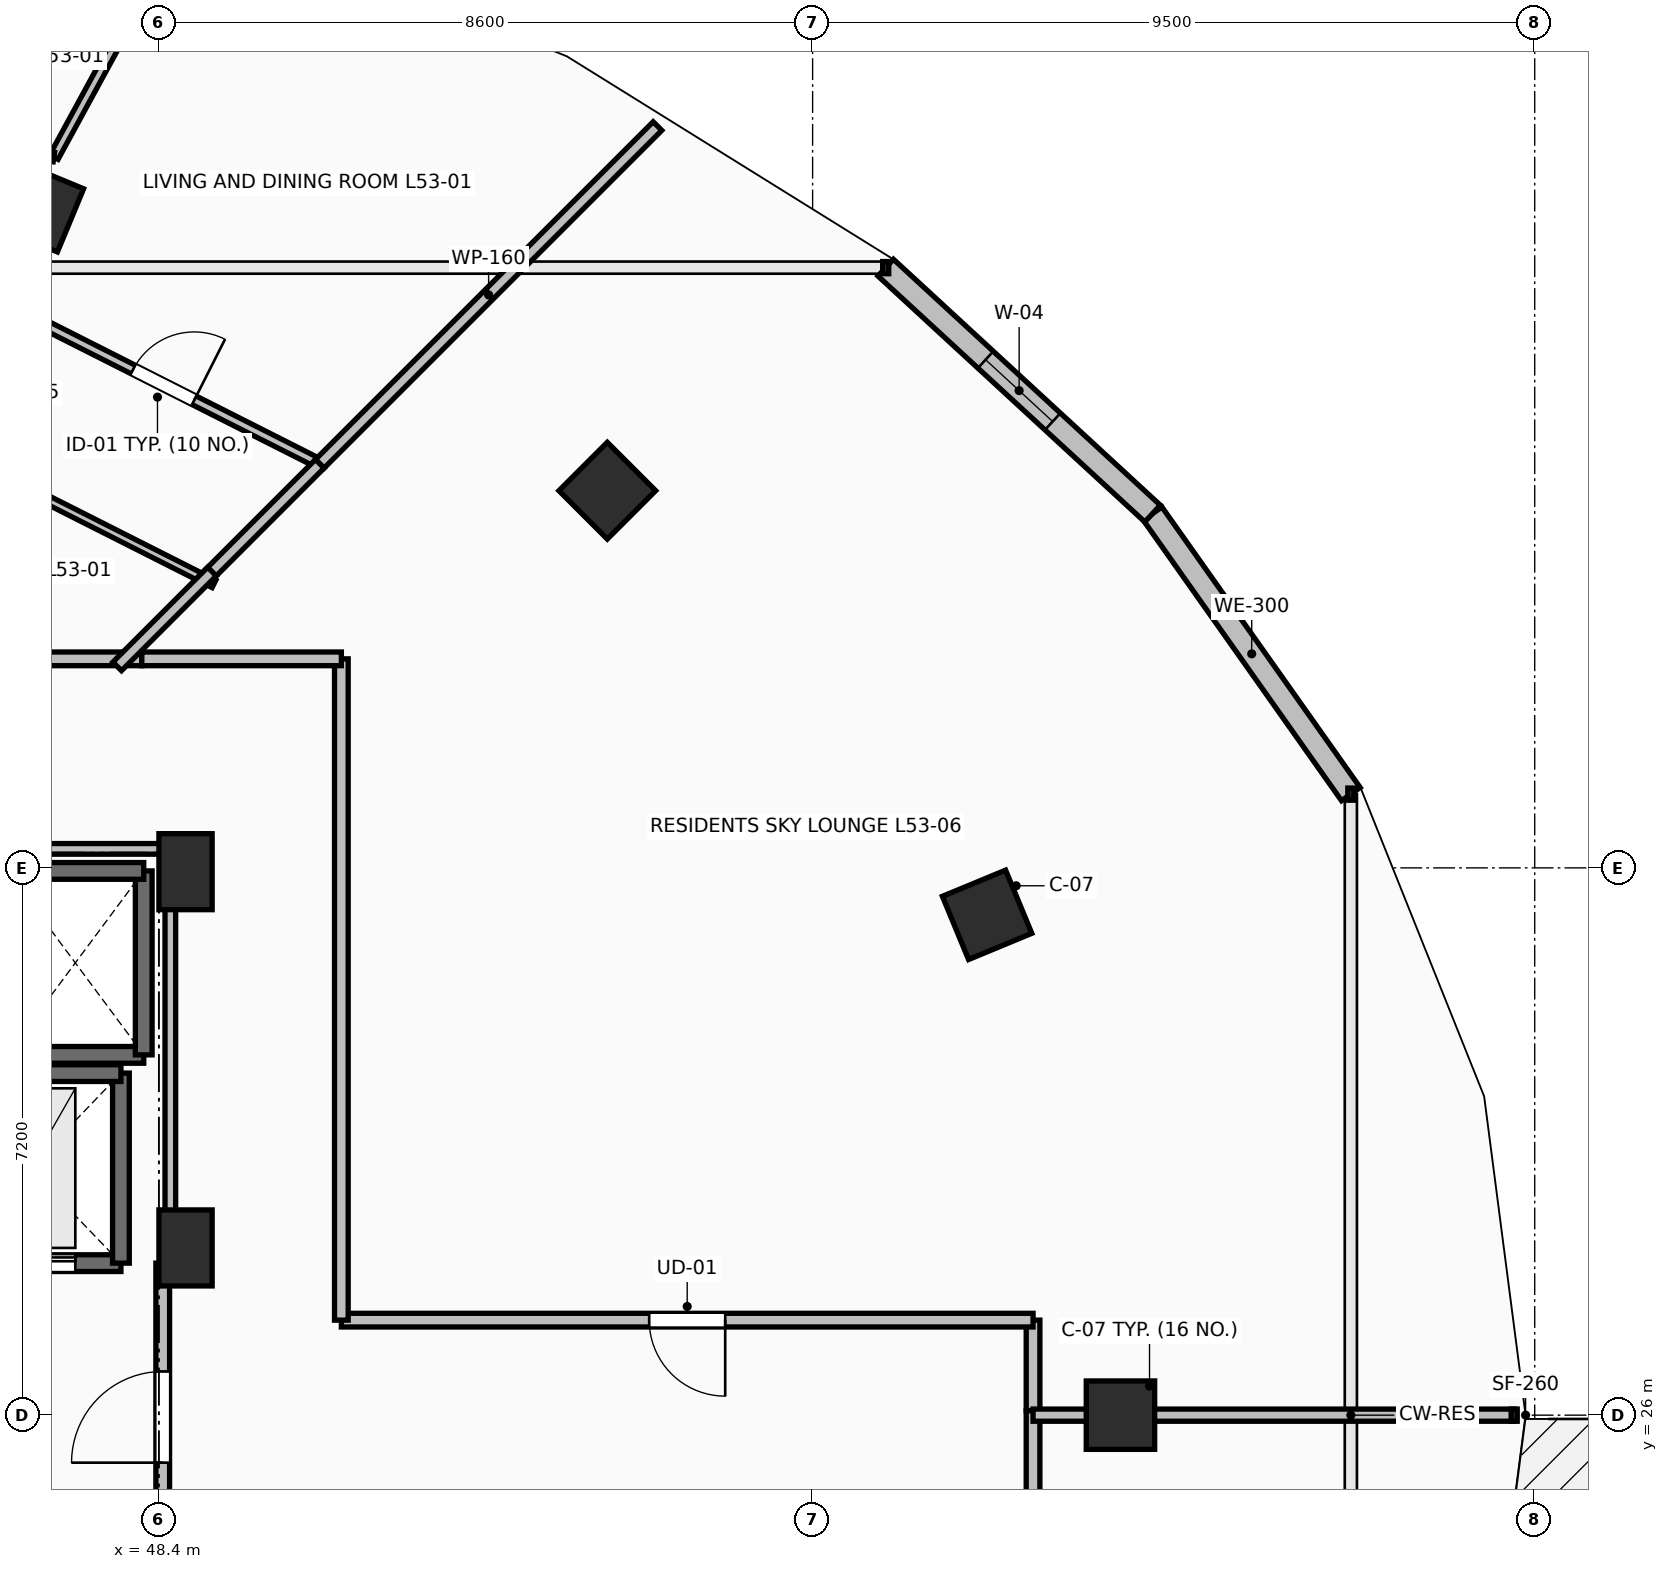
"""IFC4 building model, lengths in metres.
Left out: names, types, materials, properties, quantities, classifications, styles, units other than length and angle.
Written with IfcOpenShell. Run it as: python <this file> out.ifc"""

import sys

from ifc_helpers import new_model, si_unit, direction, frame, frame_2d, origin, origin_2d, place, context, subcontext, project, spatial, rectangle, extrude, element, fill, save


model = new_model("IFC4")
c1 = context("Model", 3, precision=1e-05, world=origin(), true_north=direction((0.0, 1.0)))
c2 = subcontext(c1, "Body", "Model", "MODEL_VIEW")
j1 = project(units=[si_unit("LENGTHUNIT", "METRE"), si_unit("PLANEANGLEUNIT", "RADIAN")], contexts=[c1])
p1 = place(None, origin())
s1 = spatial("IfcSite", under=j1, at=p1, CompositionType="ELEMENT")
p2 = place(p1, origin())
s2 = spatial("IfcBuilding", under=s1, at=p2, CompositionType="ELEMENT")
p3 = place(p2, frame((0.0, 0.0, 196.6)))
s3 = spatial("IfcBuildingStorey", under=s2, at=p3, CompositionType="ELEMENT", Elevation=196.6)
for number, where, z_axis, x_axis in (
    (1, (61.05, 26.0, 0.0), (0.0, 0.0, 1.0), (1.0, 0.0, 0.0)),
    (2, (59.295, 32.582, 0.0), (0.0, 0.0, 1.0), (0.924, 0.383, 0.0)),
    (3, (54.299, 38.162, 0.0), (0.0, 0.0, 1.0), (0.707, 0.707, 0.0)),
    (4, (46.821, 41.891, 0.0), (0.0, 0.0, 1.0), (0.383, 0.924, 0.0)),
):
    element("IfcColumn", number, at=place(p3, frame(where, z_axis=z_axis, x_axis=x_axis)), inside=s3, PredefinedType="COLUMN", context=c2, shape_type="SweptSolid", body=[
        extrude(rectangle(XDim=0.9, YDim=0.9, at=origin_2d()), origin(), (0.0, 0.0, 1.0), 3.5),
    ])
for number, where, z_axis, x_axis in (
    (5, (48.75, 33.15, 0.0), (0.0, 0.0, 1.0), (1.0, 0.0, 0.0)),
    (6, (48.75, 28.2, 0.0), (0.0, 0.0, 1.0), (1.0, 0.0, 0.0)),
):
    element("IfcColumn", number, at=place(p3, frame(where, z_axis=z_axis, x_axis=x_axis)), inside=s3, PredefinedType="PILASTER", context=c2, shape_type="SweptSolid", body=[
        extrude(rectangle(XDim=0.7, YDim=1.0, at=origin_2d()), origin(), (0.0, 0.0, 1.0), 3.5),
    ])
p4 = place(p3, frame((64.081, 34.17, 0.0), z_axis=(0.0, 0.0, 1.0), x_axis=(-0.577168747264, 0.81662490605, 0.0)))
e7 = element("IfcWall", 7, at=p4, inside=s3, PredefinedType="STANDARD", context=c2, shape_type="SweptSolid", body=[
    extrude(rectangle(XDim=4.52, YDim=0.3, at=frame_2d((2.26, 0.0))), origin(), (0.0, 0.0, 1.0), 3.24),
])
p5 = place(p3, frame((61.472, 37.861, 0.0), z_axis=(0.0, 0.0, 1.0), x_axis=(-0.735359993374, 0.677676678177, 0.0)))
e8 = element("IfcWall", 8, at=p5, inside=s3, PredefinedType="STANDARD", context=c2, shape_type="SweptSolid", body=[
    extrude(rectangle(XDim=4.774, YDim=0.3, at=frame_2d((2.387, 0.0))), origin(), (0.0, 0.0, 1.0), 3.24),
])
p6 = place(p5, frame((1.787, 0.0, 0.85)))
e9 = element("IfcOpeningElement", 9, at=p6, cuts=e8, PredefinedType="OPENING", context=c2, shape_type="SweptSolid", body=[
    extrude(rectangle(XDim=1.2, YDim=2.1, at=frame_2d((0.6, 1.05))), frame((0.0, 0.165, 0.0), z_axis=(0.0, -1.0, 0.0), x_axis=(1.0, 0.0, 0.0)), (0.0, 0.0, 1.0), 0.33),
])
p7 = place(p3, frame((46.4, 30.74, 0.0), z_axis=(0.0, 0.0, 1.0), x_axis=(1.0, 0.0, 0.0)))
e10 = element("IfcWall", 10, at=p7, inside=s3, PredefinedType="SOLIDWALL", context=c2, shape_type="SweptSolid", body=[
    extrude(rectangle(XDim=1.8, YDim=0.22, at=frame_2d((0.9, 0.0))), origin(), (0.0, 0.0, 1.0), 3.24),
])
p8 = place(p3, frame((48.2, 30.74, 0.0), z_axis=(0.0, 0.0, 1.0), x_axis=(0.0, 1.0, 0.0)))
e11 = element("IfcWall", 11, at=p8, inside=s3, PredefinedType="SOLIDWALL", context=c2, shape_type="SweptSolid", body=[
    extrude(rectangle(XDim=2.42, YDim=0.22, at=frame_2d((1.21, 0.0))), origin(), (0.0, 0.0, 1.0), 3.24),
])
p9 = place(p3, frame((48.2, 33.16, 0.0), z_axis=(0.0, 0.0, 1.0), x_axis=(-1.0, 0.0, 0.0)))
e12 = element("IfcWall", 12, at=p9, inside=s3, PredefinedType="SOLIDWALL", context=c2, shape_type="SweptSolid", body=[
    extrude(rectangle(XDim=1.8, YDim=0.22, at=frame_2d((0.9, 0.0))), origin(), (0.0, 0.0, 1.0), 3.24),
])
p10 = place(p3, frame((45.5, 28.0, 0.0), z_axis=(0.0, 0.0, 1.0), x_axis=(1.0, 0.0, 0.0)))
e13 = element("IfcWall", 13, at=p10, inside=s3, PredefinedType="SHEAR", context=c2, shape_type="SweptSolid", body=[
    extrude(rectangle(XDim=2.4, YDim=0.22, at=frame_2d((1.2, 0.0))), origin(), (0.0, 0.0, 1.0), 3.24),
])
p11 = place(p10, frame((0.6, 0.0, 0.0)))
e14 = element("IfcOpeningElement", 14, at=p11, cuts=e13, PredefinedType="OPENING", context=c2, shape_type="SweptSolid", body=[
    extrude(rectangle(XDim=1.2, YDim=2.2, at=frame_2d((0.6, 1.1))), frame((0.0, 0.125, 0.0), z_axis=(0.0, -1.0, 0.0), x_axis=(1.0, 0.0, 0.0)), (0.0, 0.0, 1.0), 0.25),
])
p12 = place(p3, frame((47.9, 28.0, 0.0), z_axis=(0.0, 0.0, 1.0), x_axis=(0.0, 1.0, 0.0)))
e15 = element("IfcWall", 15, at=p12, inside=s3, PredefinedType="SHEAR", context=c2, shape_type="SweptSolid", body=[
    extrude(rectangle(XDim=2.5, YDim=0.22, at=frame_2d((1.25, 0.0))), origin(), (0.0, 0.0, 1.0), 3.24),
])
p13 = place(p3, frame((47.9, 30.5, 0.0), z_axis=(0.0, 0.0, 1.0), x_axis=(-1.0, 0.0, 0.0)))
e16 = element("IfcWall", 16, at=p13, inside=s3, PredefinedType="SHEAR", context=c2, shape_type="SweptSolid", body=[
    extrude(rectangle(XDim=2.4, YDim=0.22, at=frame_2d((1.2, 0.0))), origin(), (0.0, 0.0, 1.0), 3.24),
])
p14 = place(p3, frame((48.45, 23.95, 0.0), z_axis=(0.0, 0.0, 1.0), x_axis=(0.0, 1.0, 0.0)))
e17 = element("IfcWall", 17, at=p14, inside=s3, PredefinedType="PARTITIONING", context=c2, shape_type="SweptSolid", body=[
    extrude(rectangle(XDim=4.05, YDim=0.18, at=frame_2d((2.025, 0.0))), origin(), (0.0, 0.0, 1.0), 3.24),
])
p15 = place(p14, frame((1.425, 0.0, 0.0)))
e18 = element("IfcOpeningElement", 18, at=p15, cuts=e17, PredefinedType="OPENING", context=c2, shape_type="SweptSolid", body=[
    extrude(rectangle(XDim=1.2, YDim=2.15, at=frame_2d((0.6, 1.075))), frame((0.0, 0.105, 0.0), z_axis=(0.0, -1.0, 0.0), x_axis=(1.0, 0.0, 0.0)), (0.0, 0.0, 1.0), 0.21),
])
p16 = place(p3, frame((48.175, 35.95, 0.0), z_axis=(0.0, 0.0, 1.0), x_axis=(-1.0, 0.0, 0.0)))
e19 = element("IfcWall", 19, at=p16, inside=s3, PredefinedType="PARTITIONING", context=c2, shape_type="SweptSolid", body=[
    extrude(rectangle(XDim=4.512, YDim=0.18, at=frame_2d((2.256, 0.0))), origin(), (0.0, 0.0, 1.0), 2.432),
])
p17 = place(p3, frame((59.9, 24.55, 0.0), z_axis=(0.0, 0.0, 1.0), x_axis=(0.0, 1.0, 0.0)))
e20 = element("IfcWall", 20, at=p17, inside=s3, PredefinedType="PARTITIONING", context=c2, shape_type="SweptSolid", body=[
    extrude(rectangle(XDim=1.51, YDim=0.18, at=frame_2d((0.755, 0.0))), origin(), (0.0, 0.0, 1.0), 2.432),
])
p18 = place(p3, frame((59.9, 26.06, 0.0), z_axis=(0.0, 0.0, 1.0), x_axis=(0.0, 1.0, 0.0)))
e21 = element("IfcWall", 21, at=p18, inside=s3, PredefinedType="PARTITIONING", context=c2, shape_type="SweptSolid", body=[
    extrude(rectangle(XDim=1.19, YDim=0.18, at=frame_2d((0.595, 0.0))), origin(), (0.0, 0.0, 1.0), 2.432),
])
p19 = place(p3, frame((59.9, 27.25, 0.0), z_axis=(0.0, 0.0, 1.0), x_axis=(-1.0, 0.0, 0.0)))
e22 = element("IfcWall", 22, at=p19, inside=s3, PredefinedType="PARTITIONING", context=c2, shape_type="SweptSolid", body=[
    extrude(rectangle(XDim=9.1, YDim=0.18, at=frame_2d((4.55, 0.0))), origin(), (0.0, 0.0, 1.0), 2.432),
])
p20 = place(p19, frame((4.05, 0.0, 0.0)))
e23 = element("IfcOpeningElement", 23, at=p20, cuts=e22, PredefinedType="OPENING", context=c2, shape_type="SweptSolid", body=[
    extrude(rectangle(XDim=1.0, YDim=2.15, at=frame_2d((0.5, 1.075))), frame((0.0, 0.105, 0.0), z_axis=(0.0, -1.0, 0.0), x_axis=(1.0, 0.0, 0.0)), (0.0, 0.0, 1.0), 0.21),
])
p21 = place(p3, frame((50.8, 27.25, 0.0), z_axis=(0.0, 0.0, 1.0), x_axis=(0.0, 1.0, 0.0)))
e24 = element("IfcWall", 24, at=p21, inside=s3, PredefinedType="PARTITIONING", context=c2, shape_type="SweptSolid", body=[
    extrude(rectangle(XDim=8.7, YDim=0.18, at=frame_2d((4.35, 0.0))), origin(), (0.0, 0.0, 1.0), 2.432),
])
p22 = place(p3, frame((50.8, 35.95, 0.0), z_axis=(0.0, 0.0, 1.0), x_axis=(-1.0, 0.0, 0.0)))
e25 = element("IfcWall", 25, at=p22, inside=s3, PredefinedType="PARTITIONING", context=c2, shape_type="SweptSolid", body=[
    extrude(rectangle(XDim=2.625, YDim=0.18, at=frame_2d((1.312, 0.0))), origin(), (0.0, 0.0, 1.0), 2.432),
])
p23 = place(p3, frame((46.408, 40.592, 0.0), z_axis=(0.0, 0.0, 1.0), x_axis=(0.89252026196, -0.451007297049, 0.0)))
e26 = element("IfcWall", 26, at=p23, inside=s3, PredefinedType="PARTITIONING", context=c2, shape_type="SweptSolid", body=[
    extrude(rectangle(XDim=4.603, YDim=0.125, at=frame_2d((2.301, 0.0))), origin(), (0.0, 0.0, 1.0), 2.432),
])
p24 = place(p23, frame((1.851, 0.0, 0.0)))
e27 = element("IfcOpeningElement", 27, at=p24, cuts=e26, PredefinedType="OPENING", context=c2, shape_type="SweptSolid", body=[
    extrude(rectangle(XDim=0.9, YDim=2.1, at=frame_2d((0.45, 1.05))), frame((0.0, 0.077, 0.0), z_axis=(0.0, -1.0, 0.0), x_axis=(1.0, 0.0, 0.0)), (0.0, 0.0, 1.0), 0.155),
])
p25 = place(p3, frame((47.896, 44.162, 0.0), z_axis=(0.0, 0.0, 1.0), x_axis=(-0.47839521225, -0.87814464691, 0.0)))
e28 = element("IfcWall", 28, at=p25, inside=s3, PredefinedType="PARTITIONING", context=c2, shape_type="SweptSolid", body=[
    extrude(rectangle(XDim=1.835, YDim=0.125, at=frame_2d((0.917, 0.0))), origin(), (0.0, 0.0, 1.0), 3.24),
])
p26 = place(p3, frame((47.018, 42.551, 0.0), z_axis=(0.0, 0.0, 1.0), x_axis=(-0.98887565722, 0.148744527827, 0.0)))
e29 = element("IfcWall", 29, at=p26, inside=s3, PredefinedType="PARTITIONING", context=c2, shape_type="SweptSolid", body=[
    extrude(rectangle(XDim=5.761, YDim=0.125, at=frame_2d((2.881, 0.0))), origin(), (0.0, 0.0, 1.0), 3.24),
])
p27 = place(p26, frame((2.43, 0.0, 0.0)))
e30 = element("IfcOpeningElement", 30, at=p27, cuts=e29, PredefinedType="OPENING", context=c2, shape_type="SweptSolid", body=[
    extrude(rectangle(XDim=0.9, YDim=2.1, at=frame_2d((0.45, 1.05))), frame((0.0, 0.077, 0.0), z_axis=(0.0, -1.0, 0.0), x_axis=(1.0, 0.0, 0.0)), (0.0, 0.0, 1.0), 0.155),
])
p28 = place(p3, frame((50.516, 38.516, 0.0), z_axis=(0.0, 0.0, 1.0), x_axis=(0.707106781187, 0.707106781187, 0.0)))
e31 = element("IfcWall", 31, at=p28, inside=s3, PredefinedType="PARTITIONING", context=c2, shape_type="SweptSolid", body=[
    extrude(rectangle(XDim=6.283, YDim=0.16, at=frame_2d((3.142, 0.0))), origin(), (0.0, 0.0, 1.0), 2.774),
])
p29 = place(p3, frame((45.264, 38.886, 0.0), z_axis=(0.0, 0.0, 1.0), x_axis=(0.892556527512, -0.450935522216, 0.0)))
e32 = element("IfcWall", 32, at=p29, inside=s3, PredefinedType="PARTITIONING", context=c2, shape_type="SweptSolid", body=[
    extrude(rectangle(XDim=4.325, YDim=0.11, at=frame_2d((2.162, 0.0))), origin(), (0.0, 0.0, 1.0), 2.432),
])
p30 = place(p3, frame((48.999, 36.999, 0.0), z_axis=(0.0, 0.0, 1.0), x_axis=(0.707106781187, 0.707106781187, 0.0)))
e33 = element("IfcWall", 33, at=p30, inside=s3, PredefinedType="PARTITIONING", context=c2, shape_type="SweptSolid", body=[
    extrude(rectangle(XDim=2.146, YDim=0.16, at=frame_2d((1.073, 0.0))), origin(), (0.0, 0.0, 1.0), 2.922),
])
p31 = place(p3, frame((47.851, 35.851, 0.0), z_axis=(0.0, 0.0, 1.0), x_axis=(0.707106781187, 0.707106781187, 0.0)))
e34 = element("IfcWall", 34, at=p31, inside=s3, PredefinedType="PARTITIONING", context=c2, shape_type="SweptSolid", body=[
    extrude(rectangle(XDim=1.763, YDim=0.16, at=frame_2d((0.882, 0.0))), origin(), (0.0, 0.0, 1.0), 2.432),
])
p32 = place(p3, frame((66.229, 26.0, 0.0), z_axis=(0.0, 0.0, 1.0), x_axis=(-1.0, 0.0, 0.0)))
e35 = element("IfcWall", 35, at=p32, inside=s3, PredefinedType="PARTITIONING", context=c2, shape_type="SweptSolid", body=[
    extrude(rectangle(XDim=6.329, YDim=0.16, at=frame_2d((3.165, 0.0))), origin(), (0.0, 0.0, 1.0), 2.432),
])
p33 = place(p3, frame((48.55, 28.196, 0.0), z_axis=(0.0, 0.0, 1.0), x_axis=(0.0, 1.0, 0.0)))
e36 = element("IfcWall", 36, at=p33, inside=s3, PredefinedType="PARTITIONING", context=c2, shape_type="SweptSolid", body=[
    extrude(rectangle(XDim=5.254, YDim=0.14, at=frame_2d((2.627, 0.0))), origin(), (0.0, 0.0, 1.0), 2.432),
])
p34 = place(p3, frame((48.55, 33.45, 0.0), z_axis=(0.0, 0.0, 1.0), x_axis=(-1.0, 0.0, 0.0)))
e37 = element("IfcWall", 37, at=p34, inside=s3, PredefinedType="PARTITIONING", context=c2, shape_type="SweptSolid", body=[
    extrude(rectangle(XDim=4.21, YDim=0.14, at=frame_2d((2.105, 0.0))), origin(), (0.0, 0.0, 1.0), 2.432),
])
p35 = place(p6, origin())
e38 = element("IfcWindow", 38, at=p35, inside=s3, PartitioningType="SINGLE_PANEL", PredefinedType="WINDOW", context=c2, shape_type="SweptSolid", body=[
    extrude(rectangle(XDim=1.2, YDim=2.1, at=frame_2d((0.6, 1.05))), frame((0.0, 0.03, 0.0), z_axis=(0.0, -1.0, 0.0), x_axis=(1.0, 0.0, 0.0)), (0.0, 0.0, 1.0), 0.06),
])
fill(e9, e38)
p36 = place(p11, origin())
e39 = element("IfcDoor", 39, at=p36, inside=s3, OperationType="SLIDING_TO_LEFT", PredefinedType="DOOR", context=c2, shape_type="SweptSolid", body=[
    extrude(rectangle(XDim=1.2, YDim=2.2, at=frame_2d((0.6, 1.1))), frame((0.0, 0.025, 0.0), z_axis=(0.0, -1.0, 0.0), x_axis=(1.0, 0.0, 0.0)), (0.0, 0.0, 1.0), 0.05),
])
fill(e14, e39)
p37 = place(p15, origin())
e40 = element("IfcDoor", 40, at=p37, inside=s3, OperationType="SINGLE_SWING_LEFT", PredefinedType="DOOR", context=c2, shape_type="SweptSolid", body=[
    extrude(rectangle(XDim=1.2, YDim=2.15, at=frame_2d((0.6, 1.075))), frame((0.0, 0.025, 0.0), z_axis=(0.0, -1.0, 0.0), x_axis=(1.0, 0.0, 0.0)), (0.0, 0.0, 1.0), 0.05),
])
fill(e18, e40)
p38 = place(p20, origin())
e41 = element("IfcDoor", 41, at=p38, inside=s3, OperationType="SINGLE_SWING_LEFT", PredefinedType="DOOR", context=c2, shape_type="SweptSolid", body=[
    extrude(rectangle(XDim=1.0, YDim=2.15, at=frame_2d((0.5, 1.075))), frame((0.0, 0.025, 0.0), z_axis=(0.0, -1.0, 0.0), x_axis=(1.0, 0.0, 0.0)), (0.0, 0.0, 1.0), 0.05),
])
fill(e23, e41)
p39 = place(p24, origin())
e42 = element("IfcDoor", 42, at=p39, inside=s3, OperationType="SINGLE_SWING_RIGHT", PredefinedType="DOOR", context=c2, shape_type="SweptSolid", body=[
    extrude(rectangle(XDim=0.9, YDim=2.1, at=frame_2d((0.45, 1.05))), frame((0.0, 0.025, 0.0), z_axis=(0.0, -1.0, 0.0), x_axis=(1.0, 0.0, 0.0)), (0.0, 0.0, 1.0), 0.05),
])
fill(e27, e42)
save(model, sys.argv[1])
